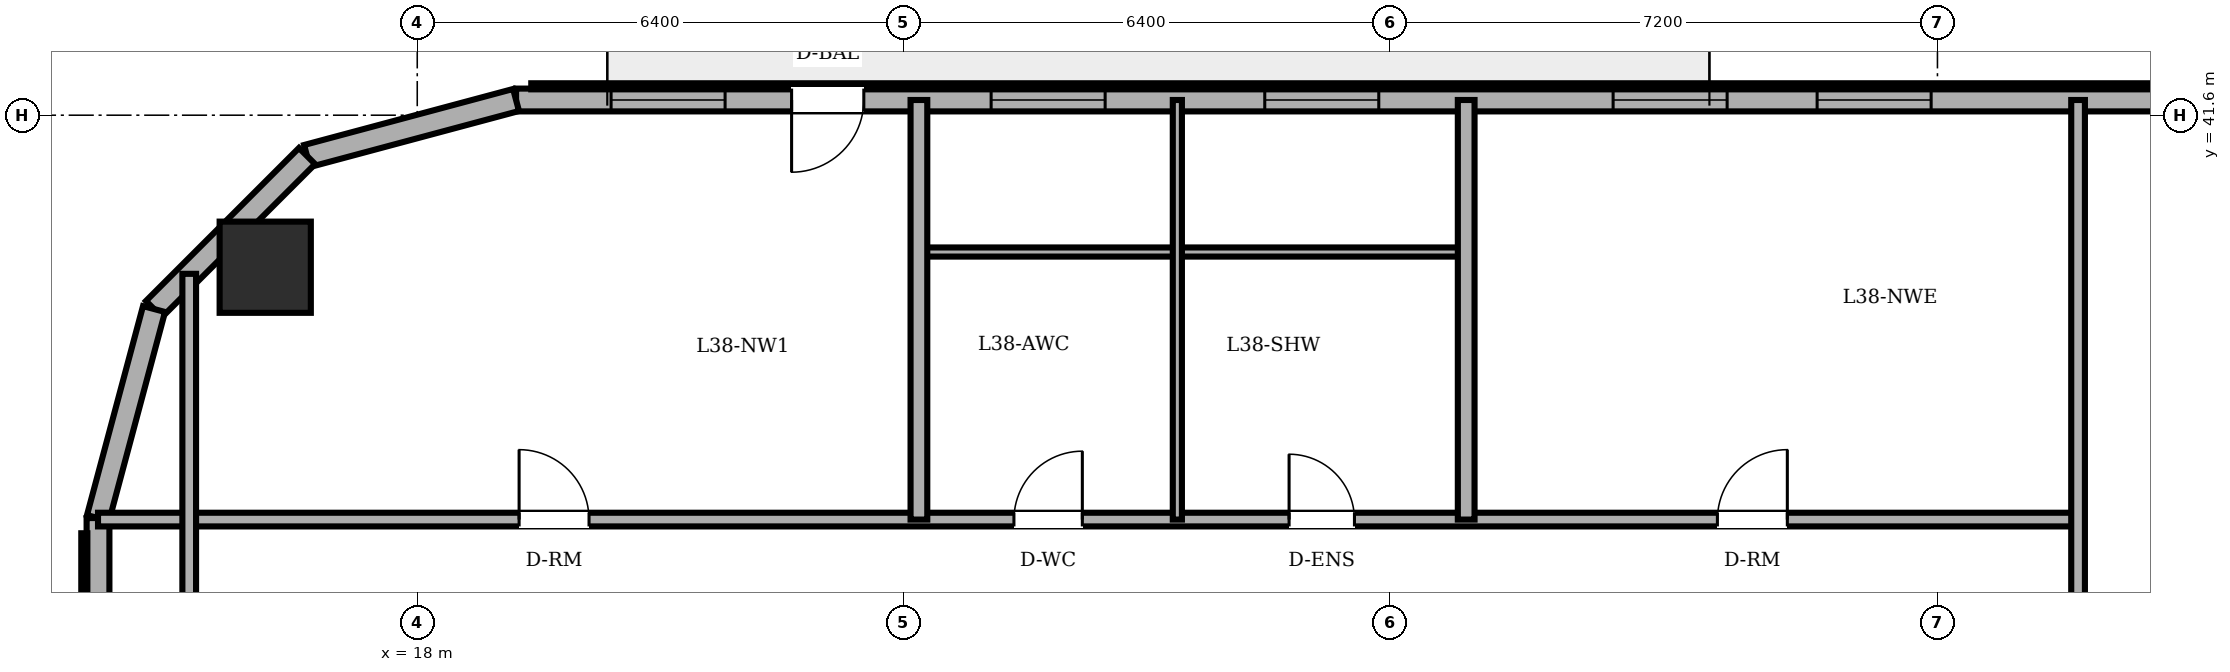
"""IFC4 building model, lengths in metres.
Left out: names, types, materials, properties, quantities, classifications, styles, units other than length and angle.
Written with IfcOpenShell. Run it as: python <this file> out.ifc"""

import sys

from ifc_helpers import new_model, si_unit, direction, frame, frame_2d, origin, origin_2d, place, context, subcontext, project, spatial, rectangle, circle, extrude, element, fill, save


model = new_model("IFC4")
c1 = context("Model", 3, precision=1e-05, world=origin(), true_north=direction((0.0, 1.0)))
c2 = subcontext(c1, "Body", "Model", "MODEL_VIEW")
j1 = project(units=[si_unit("LENGTHUNIT", "METRE"), si_unit("PLANEANGLEUNIT", "RADIAN")], contexts=[c1])
p1 = place(None, origin())
s1 = spatial("IfcSite", under=j1, at=p1, CompositionType="ELEMENT")
p2 = place(p1, origin())
s2 = spatial("IfcBuilding", under=s1, at=p2, CompositionType="ELEMENT")
p3 = place(p2, frame((0.0, 0.0, 147.4)))
s3 = spatial("IfcBuildingStorey", under=s2, at=p3, CompositionType="ELEMENT", Elevation=147.4)
p4 = place(p3, frame((16.0, 39.6, 0.0), z_axis=(0.0, 0.0, 1.0), x_axis=(1.0, 0.0, 0.0)))
e1 = element("IfcColumn", 1, at=p4, inside=s3, PredefinedType="COLUMN", context=c2, shape_type="SweptSolid", body=[
    extrude(circle(Radius=0.6, at=origin_2d()), origin(), (0.0, 0.0, 1.0), 3.6),
])
p5 = place(p3, frame((49.582, 41.8, 0.0), z_axis=(0.0, 0.0, 1.0), x_axis=(-1.0, 0.0, 0.0)))
e2 = element("IfcWall", 2, at=p5, inside=s3, PredefinedType="SOLIDWALL", context=c2, shape_type="SweptSolid", body=[
    extrude(rectangle(XDim=30.282, YDim=0.3, at=frame_2d((15.141, 0.0))), origin(), (0.0, 0.0, 1.0), 3.4),
])
p6 = place(p5, frame((25.707, 0.0, 0.0)))
e3 = element("IfcOpeningElement", 3, at=p6, cuts=e2, PredefinedType="OPENING", context=c2, shape_type="SweptSolid", body=[
    extrude(rectangle(XDim=0.95, YDim=2.2, at=frame_2d((0.475, 1.1))), frame((0.0, 0.16, 0.0), z_axis=(0.0, -1.0, 0.0), x_axis=(1.0, 0.0, 0.0)), (0.0, 0.0, 1.0), 0.32),
])
p7 = place(p5, frame((1.661, 0.0, 0.85)))
e4 = element("IfcOpeningElement", 4, at=p7, cuts=e2, PredefinedType="OPENING", context=c2, shape_type="SweptSolid", body=[
    extrude(rectangle(XDim=1.5, YDim=1.55, at=frame_2d((0.75, 0.775))), frame((0.0, 0.16, 0.0), z_axis=(0.0, -1.0, 0.0), x_axis=(1.0, 0.0, 0.0)), (0.0, 0.0, 1.0), 0.32),
])
p8 = place(p5, frame((5.476, 0.0, 0.85)))
e5 = element("IfcOpeningElement", 5, at=p8, cuts=e2, PredefinedType="OPENING", context=c2, shape_type="SweptSolid", body=[
    extrude(rectangle(XDim=1.5, YDim=1.55, at=frame_2d((0.75, 0.775))), frame((0.0, 0.16, 0.0), z_axis=(0.0, -1.0, 0.0), x_axis=(1.0, 0.0, 0.0)), (0.0, 0.0, 1.0), 0.32),
])
p9 = place(p5, frame((7.229, 0.0, 0.85)))
e6 = element("IfcOpeningElement", 6, at=p9, cuts=e2, PredefinedType="OPENING", context=c2, shape_type="SweptSolid", body=[
    extrude(rectangle(XDim=1.5, YDim=1.55, at=frame_2d((0.75, 0.775))), frame((0.0, 0.16, 0.0), z_axis=(0.0, -1.0, 0.0), x_axis=(1.0, 0.0, 0.0)), (0.0, 0.0, 1.0), 0.32),
])
p10 = place(p5, frame((11.665, 0.0, 0.85)))
e7 = element("IfcOpeningElement", 7, at=p10, cuts=e2, PredefinedType="OPENING", context=c2, shape_type="SweptSolid", body=[
    extrude(rectangle(XDim=1.5, YDim=1.55, at=frame_2d((0.75, 0.775))), frame((0.0, 0.16, 0.0), z_axis=(0.0, -1.0, 0.0), x_axis=(1.0, 0.0, 0.0)), (0.0, 0.0, 1.0), 0.32),
])
p11 = place(p5, frame((14.349, 0.0, 0.85)))
e8 = element("IfcOpeningElement", 8, at=p11, cuts=e2, PredefinedType="OPENING", context=c2, shape_type="SweptSolid", body=[
    extrude(rectangle(XDim=1.5, YDim=1.55, at=frame_2d((0.75, 0.775))), frame((0.0, 0.16, 0.0), z_axis=(0.0, -1.0, 0.0), x_axis=(1.0, 0.0, 0.0)), (0.0, 0.0, 1.0), 0.32),
])
p12 = place(p5, frame((18.932, 0.0, 0.85)))
e9 = element("IfcOpeningElement", 9, at=p12, cuts=e2, PredefinedType="OPENING", context=c2, shape_type="SweptSolid", body=[
    extrude(rectangle(XDim=1.5, YDim=1.55, at=frame_2d((0.75, 0.775))), frame((0.0, 0.16, 0.0), z_axis=(0.0, -1.0, 0.0), x_axis=(1.0, 0.0, 0.0)), (0.0, 0.0, 1.0), 0.32),
])
p13 = place(p5, frame((22.532, 0.0, 0.85)))
e10 = element("IfcOpeningElement", 10, at=p13, cuts=e2, PredefinedType="OPENING", context=c2, shape_type="SweptSolid", body=[
    extrude(rectangle(XDim=1.5, YDim=1.55, at=frame_2d((0.75, 0.775))), frame((0.0, 0.16, 0.0), z_axis=(0.0, -1.0, 0.0), x_axis=(1.0, 0.0, 0.0)), (0.0, 0.0, 1.0), 0.32),
])
p14 = place(p5, frame((27.532, 0.0, 0.85)))
e11 = element("IfcOpeningElement", 11, at=p14, cuts=e2, PredefinedType="OPENING", context=c2, shape_type="SweptSolid", body=[
    extrude(rectangle(XDim=1.5, YDim=1.55, at=frame_2d((0.75, 0.775))), frame((0.0, 0.16, 0.0), z_axis=(0.0, -1.0, 0.0), x_axis=(1.0, 0.0, 0.0)), (0.0, 0.0, 1.0), 0.32),
])
p15 = place(p3, frame((19.3, 41.8, 0.0), z_axis=(0.0, 0.0, 1.0), x_axis=(-0.965908238586, -0.258884674387, 0.0)))
e12 = element("IfcWall", 12, at=p15, inside=s3, PredefinedType="SOLIDWALL", context=c2, shape_type="SweptSolid", body=[
    extrude(rectangle(XDim=2.847, YDim=0.3, at=frame_2d((1.424, 0.0))), origin(), (0.0, 0.0, 1.0), 3.4),
])
p16 = place(p3, frame((16.55, 41.063, 0.0), z_axis=(0.0, 0.0, 1.0), x_axis=(-0.707106781187, -0.707106781187, 0.0)))
e13 = element("IfcWall", 13, at=p16, inside=s3, PredefinedType="SOLIDWALL", context=c2, shape_type="SweptSolid", body=[
    extrude(rectangle(XDim=2.847, YDim=0.3, at=frame_2d((1.423, 0.0))), origin(), (0.0, 0.0, 1.0), 3.4),
])
p17 = place(p3, frame((14.537, 39.05, 0.0), z_axis=(0.0, 0.0, 1.0), x_axis=(-0.258884674387, -0.965908238586, 0.0)))
e14 = element("IfcWall", 14, at=p17, inside=s3, PredefinedType="SOLIDWALL", context=c2, shape_type="SweptSolid", body=[
    extrude(rectangle(XDim=2.847, YDim=0.3, at=frame_2d((1.424, 0.0))), origin(), (0.0, 0.0, 1.0), 3.4),
])
p18 = place(p3, frame((13.8, 36.3, 0.0), z_axis=(0.0, 0.0, 1.0), x_axis=(0.0, -1.0, 0.0)))
e15 = element("IfcWall", 15, at=p18, inside=s3, PredefinedType="SOLIDWALL", context=c2, shape_type="SweptSolid", body=[
    extrude(rectangle(XDim=24.6, YDim=0.3, at=frame_2d((12.3, 0.0))), origin(), (0.0, 0.0, 1.0), 3.4),
])
p19 = place(p18, frame((5.003, 0.0, 0.85)))
e16 = element("IfcOpeningElement", 16, at=p19, cuts=e15, PredefinedType="OPENING", context=c2, shape_type="SweptSolid", body=[
    extrude(rectangle(XDim=1.5, YDim=1.55, at=frame_2d((0.75, 0.775))), frame((0.0, 0.16, 0.0), z_axis=(0.0, -1.0, 0.0), x_axis=(1.0, 0.0, 0.0)), (0.0, 0.0, 1.0), 0.32),
])
p20 = place(p18, frame((8.277, 0.0, 0.85)))
e17 = element("IfcOpeningElement", 17, at=p20, cuts=e15, PredefinedType="OPENING", context=c2, shape_type="SweptSolid", body=[
    extrude(rectangle(XDim=1.5, YDim=1.55, at=frame_2d((0.75, 0.775))), frame((0.0, 0.16, 0.0), z_axis=(0.0, -1.0, 0.0), x_axis=(1.0, 0.0, 0.0)), (0.0, 0.0, 1.0), 0.32),
])
p21 = place(p18, frame((14.823, 0.0, 0.85)))
e18 = element("IfcOpeningElement", 18, at=p21, cuts=e15, PredefinedType="OPENING", context=c2, shape_type="SweptSolid", body=[
    extrude(rectangle(XDim=1.5, YDim=1.55, at=frame_2d((0.75, 0.775))), frame((0.0, 0.16, 0.0), z_axis=(0.0, -1.0, 0.0), x_axis=(1.0, 0.0, 0.0)), (0.0, 0.0, 1.0), 0.32),
])
p22 = place(p18, frame((18.097, 0.0, 0.85)))
e19 = element("IfcOpeningElement", 19, at=p22, cuts=e15, PredefinedType="OPENING", context=c2, shape_type="SweptSolid", body=[
    extrude(rectangle(XDim=1.5, YDim=1.55, at=frame_2d((0.75, 0.775))), frame((0.0, 0.16, 0.0), z_axis=(0.0, -1.0, 0.0), x_axis=(1.0, 0.0, 0.0)), (0.0, 0.0, 1.0), 0.32),
])
p23 = place(p3, frame((13.8, 36.28, 0.0), z_axis=(0.0, 0.0, 1.0), x_axis=(1.0, 0.0, 0.0)))
e20 = element("IfcWall", 20, at=p23, inside=s3, PredefinedType="PARTITIONING", context=c2, shape_type="SweptSolid", body=[
    extrude(rectangle(XDim=26.05, YDim=0.18, at=frame_2d((13.025, 0.0))), origin(), (0.0, 0.0, 1.0), 3.4),
])
p24 = place(p23, frame((12.05, 0.0, 0.0)))
e21 = element("IfcOpeningElement", 21, at=p24, cuts=e20, PredefinedType="OPENING", context=c2, shape_type="SweptSolid", body=[
    extrude(rectangle(XDim=0.9, YDim=2.1, at=frame_2d((0.45, 1.05))), frame((0.0, 0.1, 0.0), z_axis=(0.0, -1.0, 0.0), x_axis=(1.0, 0.0, 0.0)), (0.0, 0.0, 1.0), 0.2),
])
p25 = place(p23, frame((15.67, 0.0, 0.0)))
e22 = element("IfcOpeningElement", 22, at=p25, cuts=e20, PredefinedType="OPENING", context=c2, shape_type="SweptSolid", body=[
    extrude(rectangle(XDim=0.86, YDim=2.1, at=frame_2d((0.43, 1.05))), frame((0.0, 0.1, 0.0), z_axis=(0.0, -1.0, 0.0), x_axis=(1.0, 0.0, 0.0)), (0.0, 0.0, 1.0), 0.2),
])
p26 = place(p23, frame((5.54, 0.0, 0.0)))
e23 = element("IfcOpeningElement", 23, at=p26, cuts=e20, PredefinedType="OPENING", context=c2, shape_type="SweptSolid", body=[
    extrude(rectangle(XDim=0.92, YDim=2.1, at=frame_2d((0.46, 1.05))), frame((0.0, 0.1, 0.0), z_axis=(0.0, -1.0, 0.0), x_axis=(1.0, 0.0, 0.0)), (0.0, 0.0, 1.0), 0.2),
])
p27 = place(p23, frame((21.305, 0.0, 0.0)))
e24 = element("IfcOpeningElement", 24, at=p27, cuts=e20, PredefinedType="OPENING", context=c2, shape_type="SweptSolid", body=[
    extrude(rectangle(XDim=0.92, YDim=2.1, at=frame_2d((0.46, 1.05))), frame((0.0, 0.1, 0.0), z_axis=(0.0, -1.0, 0.0), x_axis=(1.0, 0.0, 0.0)), (0.0, 0.0, 1.0), 0.2),
])
p28 = place(p3, frame((24.6, 39.8, 0.0), z_axis=(0.0, 0.0, 1.0), x_axis=(1.0, 0.0, 0.0)))
e25 = element("IfcWall", 25, at=p28, inside=s3, PredefinedType="PARTITIONING", context=c2, shape_type="SweptSolid", body=[
    extrude(rectangle(XDim=7.2, YDim=0.12, at=frame_2d((3.6, 0.0))), origin(), (0.0, 0.0, 1.0), 2.882),
])
p29 = place(p3, frame((15.0, 33.82, 0.0), z_axis=(0.0, 0.0, 1.0), x_axis=(0.0, 1.0, 0.0)))
e26 = element("IfcWall", 26, at=p29, inside=s3, PredefinedType="PARTITIONING", context=c2, shape_type="SweptSolid", body=[
    extrude(rectangle(XDim=5.693, YDim=0.18, at=frame_2d((2.846, 0.0))), origin(), (0.0, 0.0, 1.0), 3.4),
])
p30 = place(p3, frame((24.6, 36.28, 0.0), z_axis=(0.0, 0.0, 1.0), x_axis=(0.0, 1.0, 0.0)))
e27 = element("IfcWall", 27, at=p30, inside=s3, PredefinedType="PARTITIONING", context=c2, shape_type="SweptSolid", body=[
    extrude(rectangle(XDim=5.52, YDim=0.22, at=frame_2d((2.76, 0.0))), origin(), (0.0, 0.0, 1.0), 3.4),
])
p31 = place(p3, frame((28.0, 36.28, 0.0), z_axis=(0.0, 0.0, 1.0), x_axis=(0.0, 1.0, 0.0)))
e28 = element("IfcWall", 28, at=p31, inside=s3, PredefinedType="PARTITIONING", context=c2, shape_type="SweptSolid", body=[
    extrude(rectangle(XDim=5.52, YDim=0.12, at=frame_2d((2.76, 0.0))), origin(), (0.0, 0.0, 1.0), 3.4),
])
p32 = place(p3, frame((31.8, 36.28, 0.0), z_axis=(0.0, 0.0, 1.0), x_axis=(0.0, 1.0, 0.0)))
e29 = element("IfcWall", 29, at=p32, inside=s3, PredefinedType="PARTITIONING", context=c2, shape_type="SweptSolid", body=[
    extrude(rectangle(XDim=5.52, YDim=0.22, at=frame_2d((2.76, 0.0))), origin(), (0.0, 0.0, 1.0), 3.4),
])
p33 = place(p3, frame((39.85, 25.18, 0.0), z_axis=(0.0, 0.0, 1.0), x_axis=(0.0, 1.0, 0.0)))
e30 = element("IfcWall", 30, at=p33, inside=s3, PredefinedType="PARTITIONING", context=c2, shape_type="SweptSolid", body=[
    extrude(rectangle(XDim=16.62, YDim=0.18, at=frame_2d((8.31, 0.0))), origin(), (0.0, 0.0, 1.0), 3.4),
])
p34 = place(p33, frame((5.31, 0.0, 0.0)))
e31 = element("IfcOpeningElement", 31, at=p34, cuts=e30, PredefinedType="OPENING", context=c2, shape_type="SweptSolid", body=[
    extrude(rectangle(XDim=1.0, YDim=2.15, at=frame_2d((0.5, 1.075))), frame((0.0, 0.1, 0.0), z_axis=(0.0, -1.0, 0.0), x_axis=(1.0, 0.0, 0.0)), (0.0, 0.0, 1.0), 0.2),
])
p35 = place(p6, origin())
e32 = element("IfcDoor", 32, at=p35, inside=s3, OperationType="SINGLE_SWING_RIGHT", PredefinedType="DOOR", context=c2, shape_type="SweptSolid", body=[
    extrude(rectangle(XDim=0.95, YDim=2.2, at=frame_2d((0.475, 1.1))), frame((0.0, 0.025, 0.0), z_axis=(0.0, -1.0, 0.0), x_axis=(1.0, 0.0, 0.0)), (0.0, 0.0, 1.0), 0.05),
])
fill(e3, e32)
p36 = place(p10, origin())
e33 = element("IfcWindow", 33, at=p36, inside=s3, PartitioningType="DOUBLE_PANEL_VERTICAL", PredefinedType="WINDOW", context=c2, shape_type="SweptSolid", body=[
    extrude(rectangle(XDim=1.5, YDim=1.55, at=frame_2d((0.75, 0.775))), frame((0.0, 0.03, 0.0), z_axis=(0.0, -1.0, 0.0), x_axis=(1.0, 0.0, 0.0)), (0.0, 0.0, 1.0), 0.06),
])
fill(e7, e33)
p37 = place(p11, origin())
e34 = element("IfcWindow", 34, at=p37, inside=s3, PartitioningType="DOUBLE_PANEL_VERTICAL", PredefinedType="WINDOW", context=c2, shape_type="SweptSolid", body=[
    extrude(rectangle(XDim=1.5, YDim=1.55, at=frame_2d((0.75, 0.775))), frame((0.0, 0.03, 0.0), z_axis=(0.0, -1.0, 0.0), x_axis=(1.0, 0.0, 0.0)), (0.0, 0.0, 1.0), 0.06),
])
fill(e8, e34)
p38 = place(p12, origin())
e35 = element("IfcWindow", 35, at=p38, inside=s3, PartitioningType="DOUBLE_PANEL_VERTICAL", PredefinedType="WINDOW", context=c2, shape_type="SweptSolid", body=[
    extrude(rectangle(XDim=1.5, YDim=1.55, at=frame_2d((0.75, 0.775))), frame((0.0, 0.03, 0.0), z_axis=(0.0, -1.0, 0.0), x_axis=(1.0, 0.0, 0.0)), (0.0, 0.0, 1.0), 0.06),
])
fill(e9, e35)
p39 = place(p13, origin())
e36 = element("IfcWindow", 36, at=p39, inside=s3, PartitioningType="DOUBLE_PANEL_VERTICAL", PredefinedType="WINDOW", context=c2, shape_type="SweptSolid", body=[
    extrude(rectangle(XDim=1.5, YDim=1.55, at=frame_2d((0.75, 0.775))), frame((0.0, 0.03, 0.0), z_axis=(0.0, -1.0, 0.0), x_axis=(1.0, 0.0, 0.0)), (0.0, 0.0, 1.0), 0.06),
])
fill(e10, e36)
p40 = place(p14, origin())
e37 = element("IfcWindow", 37, at=p40, inside=s3, PartitioningType="DOUBLE_PANEL_VERTICAL", PredefinedType="WINDOW", context=c2, shape_type="SweptSolid", body=[
    extrude(rectangle(XDim=1.5, YDim=1.55, at=frame_2d((0.75, 0.775))), frame((0.0, 0.03, 0.0), z_axis=(0.0, -1.0, 0.0), x_axis=(1.0, 0.0, 0.0)), (0.0, 0.0, 1.0), 0.06),
])
fill(e11, e37)
p41 = place(p24, origin())
e38 = element("IfcDoor", 38, at=p41, inside=s3, OperationType="SINGLE_SWING_RIGHT", PredefinedType="DOOR", context=c2, shape_type="SweptSolid", body=[
    extrude(rectangle(XDim=0.9, YDim=2.1, at=frame_2d((0.45, 1.05))), frame((0.0, 0.025, 0.0), z_axis=(0.0, -1.0, 0.0), x_axis=(1.0, 0.0, 0.0)), (0.0, 0.0, 1.0), 0.05),
])
fill(e21, e38)
p42 = place(p25, origin())
e39 = element("IfcDoor", 39, at=p42, inside=s3, OperationType="SINGLE_SWING_LEFT", PredefinedType="DOOR", context=c2, shape_type="SweptSolid", body=[
    extrude(rectangle(XDim=0.86, YDim=2.1, at=frame_2d((0.43, 1.05))), frame((0.0, 0.025, 0.0), z_axis=(0.0, -1.0, 0.0), x_axis=(1.0, 0.0, 0.0)), (0.0, 0.0, 1.0), 0.05),
])
fill(e22, e39)
p43 = place(p26, origin())
e40 = element("IfcDoor", 40, at=p43, inside=s3, OperationType="SINGLE_SWING_LEFT", PredefinedType="DOOR", context=c2, shape_type="SweptSolid", body=[
    extrude(rectangle(XDim=0.92, YDim=2.1, at=frame_2d((0.46, 1.05))), frame((0.0, 0.025, 0.0), z_axis=(0.0, -1.0, 0.0), x_axis=(1.0, 0.0, 0.0)), (0.0, 0.0, 1.0), 0.05),
])
fill(e23, e40)
p44 = place(p27, origin())
e41 = element("IfcDoor", 41, at=p44, inside=s3, OperationType="SINGLE_SWING_RIGHT", PredefinedType="DOOR", context=c2, shape_type="SweptSolid", body=[
    extrude(rectangle(XDim=0.92, YDim=2.1, at=frame_2d((0.46, 1.05))), frame((0.0, 0.025, 0.0), z_axis=(0.0, -1.0, 0.0), x_axis=(1.0, 0.0, 0.0)), (0.0, 0.0, 1.0), 0.05),
])
fill(e24, e41)
save(model, sys.argv[1])
